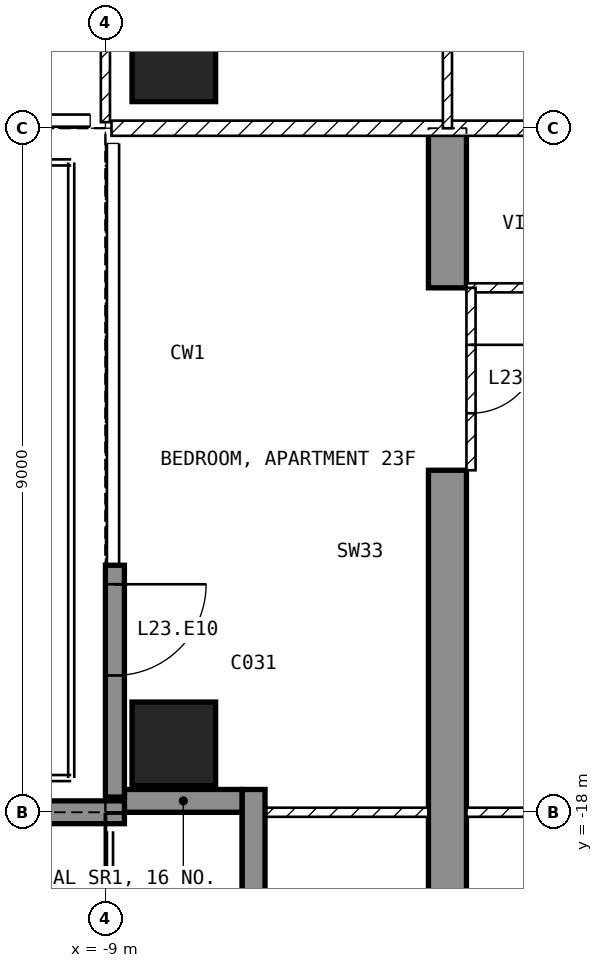
"""IFC4 building model, lengths in metres.
Left out: names, types, materials, properties, quantities, classifications, styles, units other than length and angle.
Written with IfcOpenShell. Run it as: python <this file> out.ifc"""

import sys

from ifc_helpers import new_model, si_unit, direction, frame, frame_2d, origin, origin_2d, place, context, subcontext, project, spatial, polyline, rectangle, outline, extrude, element, fill, save


model = new_model("IFC4")
c1 = context("Model", 3, precision=1e-05, world=origin(), true_north=direction((0.0, 1.0)))
c2 = subcontext(c1, "Body", "Model", "MODEL_VIEW")
j1 = project(units=[si_unit("LENGTHUNIT", "METRE"), si_unit("PLANEANGLEUNIT", "RADIAN")], contexts=[c1])
p1 = place(None, origin())
s1 = spatial("IfcSite", under=j1, at=p1, CompositionType="ELEMENT")
p2 = place(p1, origin())
s2 = spatial("IfcBuilding", under=s1, at=p2, CompositionType="ELEMENT")
p3 = place(p2, frame((0.0, 0.0, 102.4)))
s3 = spatial("IfcBuildingStorey", under=s2, at=p3, CompositionType="ELEMENT", Elevation=102.4)
for number, where, z_axis, x_axis in (
    (1, (-8.1, -17.1, -0.25), (0.0, 0.0, 1.0), (1.0, 0.0, 0.0)),
    (2, (-8.1, -8.1, -0.25), (0.0, 0.0, 1.0), (1.0, 0.0, 0.0)),
):
    element("IfcColumn", number, at=place(p3, frame(where, z_axis=z_axis, x_axis=x_axis)), inside=s3, PredefinedType="COLUMN", context=c2, shape_type="SweptSolid", body=[
        extrude(rectangle(XDim=1.1, YDim=1.1, at=origin_2d()), origin(), (0.0, 0.0, 1.0), 3.5),
    ])
p4 = place(p3, frame((-4.75, -20.15, -0.25), z_axis=(1.0, 0.0, 0.0), x_axis=(0.0, 1.0, 0.0)))
e3 = element("IfcWall", 3, at=p4, inside=s3, PredefinedType="SHEAR", context=c2, shape_type="SweptSolid", body=[
    extrude(outline(polyline([(0.0, 0.0), (6.65, 0.0), (6.65, 2.65), (9.05, 2.65), (9.05, 0.0), (11.15, 0.0), (11.15, 3.5), (0.0, 3.5), (0.0, 0.0)])), origin(), (0.0, 0.0, 1.0), 0.5),
])
p5 = place(p3, frame((-8.875, -14.75, 0.0), z_axis=(0.0, 0.0, 1.0), x_axis=(0.0, -1.0, 0.0)))
e4 = element("IfcWall", 4, at=p5, inside=s3, PredefinedType="SOLIDWALL", context=c2, shape_type="SweptSolid", body=[
    extrude(rectangle(XDim=3.05, YDim=0.25, at=frame_2d((1.525, 0.0))), origin(), (0.0, 0.0, 1.0), 3.25),
])
p6 = place(p5, frame((0.25, 0.0, 0.0)))
e5 = element("IfcOpeningElement", 5, at=p6, cuts=e4, PredefinedType="OPENING", context=c2, shape_type="SweptSolid", body=[
    extrude(rectangle(XDim=1.2, YDim=2.4, at=frame_2d((0.6, 1.2))), frame((0.0, 0.135, 0.0), z_axis=(0.0, -1.0, 0.0), x_axis=(1.0, 0.0, 0.0)), (0.0, 0.0, 1.0), 0.27),
])
p7 = place(p3, frame((-8.75, -17.85, 0.0), z_axis=(0.0, 0.0, 1.0), x_axis=(1.0, 0.0, 0.0)))
e6 = element("IfcWall", 6, at=p7, inside=s3, PredefinedType="SOLIDWALL", context=c2, shape_type="SweptSolid", body=[
    extrude(rectangle(XDim=1.55, YDim=0.3, at=frame_2d((0.775, 0.0))), origin(), (0.0, 0.0, 1.0), 3.25),
])
p8 = place(p3, frame((-7.05, -17.7, 0.0), z_axis=(0.0, 0.0, 1.0), x_axis=(0.0, -1.0, 0.0)))
e7 = element("IfcWall", 7, at=p8, inside=s3, PredefinedType="SOLIDWALL", context=c2, shape_type="SweptSolid", body=[
    extrude(rectangle(XDim=1.8, YDim=0.3, at=frame_2d((0.9, 0.0))), origin(), (0.0, 0.0, 1.0), 3.25),
])
p9 = place(p3, frame((-8.75, -18.0, 0.0), z_axis=(0.0, 0.0, 1.0), x_axis=(-1.0, 0.0, 0.0)))
e8 = element("IfcWall", 8, at=p9, inside=s3, PredefinedType="SOLIDWALL", context=c2, shape_type="SweptSolid", body=[
    extrude(rectangle(XDim=2.99, YDim=0.3, at=frame_2d((1.495, 0.0))), origin(), (0.0, 0.0, 1.0), 3.25),
])
p10 = place(p3, frame((8.92, -9.0, 0.0), z_axis=(0.0, 0.0, 1.0), x_axis=(-1.0, 0.0, 0.0)))
e9 = element("IfcWall", 9, at=p10, inside=s3, PredefinedType="PARTITIONING", context=c2, shape_type="SweptSolid", body=[
    extrude(rectangle(XDim=17.84, YDim=0.2, at=frame_2d((8.92, 0.0))), origin(), (0.0, 0.0, 1.0), 3.25),
])
p11 = place(p10, frame((8.42, 0.0, 0.0)))
e10 = element("IfcOpeningElement", 10, at=p11, cuts=e9, PredefinedType="OPENING", context=c2, shape_type="SweptSolid", body=[
    extrude(rectangle(XDim=1.0, YDim=2.1, at=frame_2d((0.5, 1.05))), frame((0.0, 0.11, 0.0), z_axis=(0.0, -1.0, 0.0), x_axis=(1.0, 0.0, 0.0)), (0.0, 0.0, 1.0), 0.22),
])
p12 = place(p3, frame((-9.0, -1.3, 0.0), z_axis=(0.0, 0.0, 1.0), x_axis=(0.0, -1.0, 0.0)))
e11 = element("IfcWall", 11, at=p12, inside=s3, PredefinedType="PARTITIONING", context=c2, shape_type="SweptSolid", body=[
    extrude(rectangle(XDim=7.62, YDim=0.12, at=frame_2d((3.81, 0.0))), origin(), (0.0, 0.0, 1.0), 3.25),
])
p13 = place(p12, frame((4.1, 0.0, 0.0)))
e12 = element("IfcOpeningElement", 12, at=p13, cuts=e11, PredefinedType="OPENING", context=c2, shape_type="SweptSolid", body=[
    extrude(rectangle(XDim=0.9, YDim=2.1, at=frame_2d((0.45, 1.05))), frame((0.0, 0.07, 0.0), z_axis=(0.0, -1.0, 0.0), x_axis=(1.0, 0.0, 0.0)), (0.0, 0.0, 1.0), 0.14),
])
p14 = place(p3, frame((-4.5, -4.5, 0.0), z_axis=(0.0, 0.0, 1.0), x_axis=(0.0, -1.0, 0.0)))
e13 = element("IfcWall", 13, at=p14, inside=s3, PredefinedType="PARTITIONING", context=c2, shape_type="SweptSolid", body=[
    extrude(rectangle(XDim=4.5, YDim=0.12, at=frame_2d((2.25, 0.0))), origin(), (0.0, 0.0, 1.0), 3.25),
])
p15 = place(p14, frame((1.8, 0.0, 0.0)))
e14 = element("IfcOpeningElement", 14, at=p15, cuts=e13, PredefinedType="OPENING", context=c2, shape_type="SweptSolid", body=[
    extrude(rectangle(XDim=0.9, YDim=2.1, at=frame_2d((0.45, 1.05))), frame((0.0, 0.07, 0.0), z_axis=(0.0, -1.0, 0.0), x_axis=(1.0, 0.0, 0.0)), (0.0, 0.0, 1.0), 0.14),
])
p16 = place(p3, frame((2.1, -11.1, 0.0), z_axis=(0.0, 0.0, 1.0), x_axis=(-1.0, 0.0, 0.0)))
e15 = element("IfcWall", 15, at=p16, inside=s3, PredefinedType="PARTITIONING", context=c2, shape_type="SweptSolid", body=[
    extrude(rectangle(XDim=6.35, YDim=0.12, at=frame_2d((3.175, 0.0))), origin(), (0.0, 0.0, 1.0), 3.25),
])
p17 = place(p16, frame((2.725, 0.0, 0.0)))
e16 = element("IfcOpeningElement", 16, at=p17, cuts=e15, PredefinedType="OPENING", context=c2, shape_type="SweptSolid", body=[
    extrude(rectangle(XDim=0.9, YDim=2.1, at=frame_2d((0.45, 1.05))), frame((0.0, 0.07, 0.0), z_axis=(0.0, -1.0, 0.0), x_axis=(1.0, 0.0, 0.0)), (0.0, 0.0, 1.0), 0.14),
])
p18 = place(p3, frame((4.25, -18.0, 0.0), z_axis=(0.0, 0.0, 1.0), x_axis=(-1.0, 0.0, 0.0)))
e17 = element("IfcWall", 17, at=p18, inside=s3, PredefinedType="PARTITIONING", context=c2, shape_type="SweptSolid", body=[
    extrude(rectangle(XDim=8.5, YDim=0.12, at=frame_2d((4.25, 0.0))), origin(), (0.0, 0.0, 1.0), 3.25),
])
p19 = place(p18, frame((5.675, 0.0, 0.0)))
e18 = element("IfcOpeningElement", 18, at=p19, cuts=e17, PredefinedType="OPENING", context=c2, shape_type="SweptSolid", body=[
    extrude(rectangle(XDim=0.9, YDim=2.1, at=frame_2d((0.45, 1.05))), frame((0.0, 0.07, 0.0), z_axis=(0.0, -1.0, 0.0), x_axis=(1.0, 0.0, 0.0)), (0.0, 0.0, 1.0), 0.14),
])
p20 = place(p3, frame((-4.75, -18.0, 0.0), z_axis=(0.0, 0.0, 1.0), x_axis=(-1.0, 0.0, 0.0)))
e19 = element("IfcWall", 19, at=p20, inside=s3, PredefinedType="PARTITIONING", context=c2, shape_type="SweptSolid", body=[
    extrude(rectangle(XDim=2.37, YDim=0.12, at=frame_2d((1.185, 0.0))), origin(), (0.0, 0.0, 1.0), 3.25),
])
p21 = place(p3, frame((-4.19, -11.1, 0.0), z_axis=(0.0, 0.0, 1.0), x_axis=(0.0, -1.0, 0.0)))
e20 = element("IfcWall", 20, at=p21, inside=s3, PredefinedType="PARTITIONING", context=c2, shape_type="SweptSolid", body=[
    extrude(rectangle(XDim=2.4, YDim=0.12, at=frame_2d((1.2, 0.0))), origin(), (0.0, 0.0, 1.0), 2.4),
])
p22 = place(p21, frame((0.75, 0.0, 0.0)))
e21 = element("IfcOpeningElement", 21, at=p22, cuts=e20, PredefinedType="OPENING", context=c2, shape_type="SweptSolid", body=[
    extrude(rectangle(XDim=0.9, YDim=2.1, at=frame_2d((0.45, 1.05))), frame((0.0, 0.07, 0.0), z_axis=(0.0, -1.0, 0.0), x_axis=(1.0, 0.0, 0.0)), (0.0, 0.0, 1.0), 0.14),
])
p23 = place(p6, origin())
e22 = element("IfcDoor", 22, at=p23, inside=s3, OperationType="SINGLE_SWING_LEFT", PredefinedType="DOOR", context=c2, shape_type="SweptSolid", body=[
    extrude(rectangle(XDim=1.2, YDim=2.4, at=frame_2d((0.6, 1.2))), frame((0.0, 0.025, 0.0), z_axis=(0.0, -1.0, 0.0), x_axis=(1.0, 0.0, 0.0)), (0.0, 0.0, 1.0), 0.05),
])
fill(e5, e22)
p24 = place(p22, origin())
e23 = element("IfcDoor", 23, at=p24, inside=s3, OperationType="SINGLE_SWING_LEFT", PredefinedType="DOOR", context=c2, shape_type="SweptSolid", body=[
    extrude(rectangle(XDim=0.9, YDim=2.1, at=frame_2d((0.45, 1.05))), frame((0.0, 0.025, 0.0), z_axis=(0.0, -1.0, 0.0), x_axis=(1.0, 0.0, 0.0)), (0.0, 0.0, 1.0), 0.05),
])
fill(e21, e23)
save(model, sys.argv[1])
